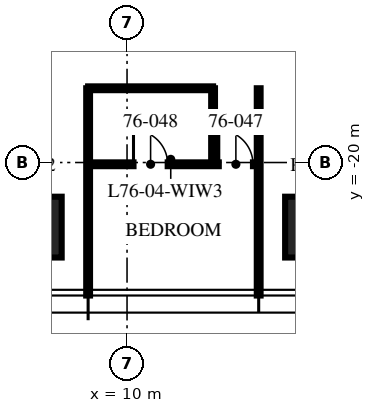
"""IFC4 building model, lengths in metres.
Left out: names, types, materials, properties, quantities, classifications, styles, units other than length and angle.
Written with IfcOpenShell. Run it as: python <this file> out.ifc"""

import sys

from ifc_helpers import new_model, si_unit, direction, frame, frame_2d, origin, origin_2d, place, context, subcontext, project, spatial, rectangle, extrude, element, fill, save


model = new_model("IFC4")
c1 = context("Model", 3, precision=1e-05, world=origin(), true_north=direction((0.0, 1.0)))
c2 = subcontext(c1, "Body", "Model", "MODEL_VIEW")
j1 = project(units=[si_unit("LENGTHUNIT", "METRE"), si_unit("PLANEANGLEUNIT", "RADIAN")], contexts=[c1])
p1 = place(None, origin())
s1 = spatial("IfcSite", under=j1, at=p1, CompositionType="ELEMENT")
p2 = place(p1, origin())
s2 = spatial("IfcBuilding", under=s1, at=p2, CompositionType="ELEMENT")
p3 = place(p2, frame((0.0, 0.0, 304.5)))
s3 = spatial("IfcBuildingStorey", under=s2, at=p3, CompositionType="ELEMENT", Elevation=304.5)
for number, where, z_axis, x_axis in (
    (1, (14.96, -21.7, 0.0), (0.0, 0.0, 1.0), (1.0, 0.0, 0.0)),
    (2, (7.48, -21.7, 0.0), (0.0, 0.0, 1.0), (1.0, 0.0, 0.0)),
):
    element("IfcColumn", number, at=place(p3, frame(where, z_axis=z_axis, x_axis=x_axis)), inside=s3, PredefinedType="COLUMN", context=c2, shape_type="SweptSolid", body=[
        extrude(rectangle(XDim=1.6, YDim=1.6, at=origin_2d()), origin(), (0.0, 0.0, 1.0), 3.75),
    ])
for number, where, z_axis, x_axis in (
    (3, (8.976, -18.046, 0.0), (0.0, 0.0, 1.0), (0.0, -1.0, 0.0)),
    (4, (13.464, -18.046, 0.0), (0.0, 0.0, 1.0), (0.0, -1.0, 0.0)),
):
    element("IfcWall", number, at=place(p3, frame(where, z_axis=z_axis, x_axis=x_axis)), inside=s3, PredefinedType="PARTITIONING", context=c2, shape_type="SweptSolid", body=[
        extrude(rectangle(XDim=5.454, YDim=0.1, at=frame_2d((2.727, 0.0))), origin(), (0.0, 0.0, 1.0), 3.01),
    ])
p4 = place(p3, frame((8.976, -20.046, 0.0), z_axis=(0.0, 0.0, 1.0), x_axis=(1.0, 0.0, 0.0)))
e5 = element("IfcWall", 5, at=p4, inside=s3, PredefinedType="PARTITIONING", context=c2, shape_type="SweptSolid", body=[
    extrude(rectangle(XDim=4.488, YDim=0.1, at=frame_2d((2.244, 0.0))), origin(), (0.0, 0.0, 1.0), 2.91),
])
p5 = place(p4, frame((3.438, 0.0, 0.0)))
e6 = element("IfcOpeningElement", 6, at=p5, cuts=e5, PredefinedType="OPENING", context=c2, shape_type="SweptSolid", body=[
    extrude(rectangle(XDim=0.9, YDim=2.1, at=frame_2d((0.45, 1.05))), frame((0.0, 0.06, 0.0), z_axis=(0.0, -1.0, 0.0), x_axis=(1.0, 0.0, 0.0)), (0.0, 0.0, 1.0), 0.12),
])
p6 = place(p4, frame((1.194, 0.0, 0.0)))
e7 = element("IfcOpeningElement", 7, at=p6, cuts=e5, PredefinedType="OPENING", context=c2, shape_type="SweptSolid", body=[
    extrude(rectangle(XDim=0.9, YDim=2.1, at=frame_2d((0.45, 1.05))), frame((0.0, 0.06, 0.0), z_axis=(0.0, -1.0, 0.0), x_axis=(1.0, 0.0, 0.0)), (0.0, 0.0, 1.0), 0.12),
])
p7 = place(p3, frame((12.264, -18.046, 0.0), z_axis=(0.0, 0.0, 1.0), x_axis=(0.0, -1.0, 0.0)))
e8 = element("IfcWall", 8, at=p7, inside=s3, PredefinedType="PARTITIONING", context=c2, shape_type="SweptSolid", body=[
    extrude(rectangle(XDim=2.0, YDim=0.1, at=frame_2d((1.0, 0.0))), origin(), (0.0, 0.0, 1.0), 3.5),
])
p8 = place(p3, frame((8.976, -18.046, 0.0), z_axis=(0.0, 0.0, 1.0), x_axis=(1.0, 0.0, 0.0)))
e9 = element("IfcWall", 9, at=p8, inside=s3, PredefinedType="PARTITIONING", context=c2, shape_type="SweptSolid", body=[
    extrude(rectangle(XDim=3.288, YDim=0.1, at=frame_2d((1.644, 0.0))), origin(), (0.0, 0.0, 1.0), 2.91),
])
p9 = place(p5, origin())
e10 = element("IfcDoor", 10, at=p9, inside=s3, OperationType="SINGLE_SWING_LEFT", PredefinedType="DOOR", context=c2, shape_type="SweptSolid", body=[
    extrude(rectangle(XDim=0.9, YDim=2.1, at=frame_2d((0.45, 1.05))), frame((0.0, 0.025, 0.0), z_axis=(0.0, -1.0, 0.0), x_axis=(1.0, 0.0, 0.0)), (0.0, 0.0, 1.0), 0.05),
])
fill(e6, e10)
p10 = place(p6, origin())
e11 = element("IfcDoor", 11, at=p10, inside=s3, OperationType="SINGLE_SWING_LEFT", PredefinedType="DOOR", context=c2, shape_type="SweptSolid", body=[
    extrude(rectangle(XDim=0.9, YDim=2.1, at=frame_2d((0.45, 1.05))), frame((0.0, 0.025, 0.0), z_axis=(0.0, -1.0, 0.0), x_axis=(1.0, 0.0, 0.0)), (0.0, 0.0, 1.0), 0.05),
])
fill(e7, e11)
save(model, sys.argv[1])
